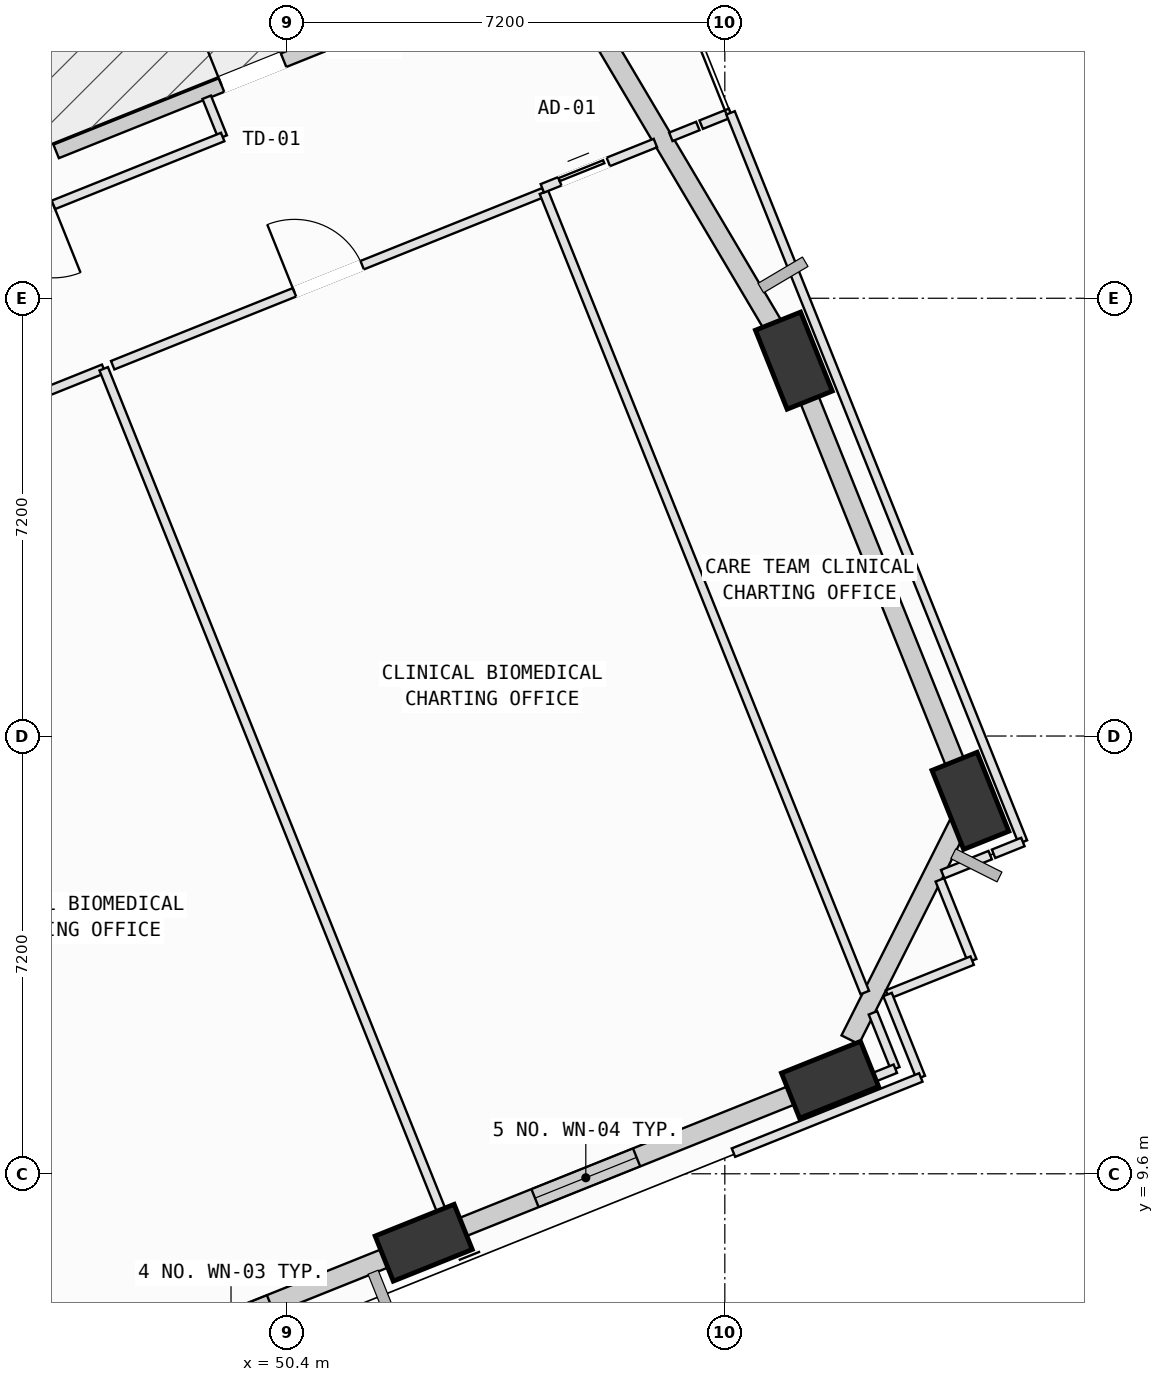
"""IFC4 building model, lengths in metres.
Left out: names, types, materials, properties, quantities, classifications, styles, units other than length and angle.
Written with IfcOpenShell. Run it as: python <this file> out.ifc"""

import sys

from ifc_helpers import new_model, si_unit, direction, frame, frame_2d, origin, origin_2d, place, context, subcontext, project, spatial, rectangle, extrude, element, fill, save


model = new_model("IFC4")
c1 = context("Model", 3, precision=1e-05, world=origin(), true_north=direction((0.0, 1.0)))
c2 = subcontext(c1, "Body", "Model", "MODEL_VIEW")
j1 = project(units=[si_unit("LENGTHUNIT", "METRE"), si_unit("PLANEANGLEUNIT", "RADIAN")], contexts=[c1])
p1 = place(None, origin())
s1 = spatial("IfcSite", under=j1, at=p1, CompositionType="ELEMENT")
p2 = place(p1, origin())
s2 = spatial("IfcBuilding", under=s1, at=p2, CompositionType="ELEMENT")
p3 = place(p2, frame((0.0, 0.0, 116.4)))
s3 = spatial("IfcBuildingStorey", under=s2, at=p3, CompositionType="ELEMENT", Elevation=116.4)
p4 = place(p3, frame((52.648, 8.466, 0.002), z_axis=(0.066717836338, 0.079113499919, 0.99463047633), x_axis=(-0.948183509475, 0.31537991624, 0.038516759879)))
e1 = element("IfcColumn", 1, at=p4, inside=s3, PredefinedType="COLUMN", context=c2, shape_type="SweptSolid", body=[
    extrude(rectangle(XDim=1.4, YDim=0.8, at=origin_2d()), origin(), (0.0, 0.0, 1.0), 4.018),
])
p5 = place(p3, frame((59.331, 11.146, 0.002), z_axis=(0.055313130163, 0.106380734984, 0.992785775913), x_axis=(-0.993950581944, 0.100353737632, 0.044624746467)))
e2 = element("IfcColumn", 2, at=p5, inside=s3, PredefinedType="COLUMN", context=c2, shape_type="SweptSolid", body=[
    extrude(rectangle(XDim=1.4, YDim=0.8, at=origin_2d()), origin(), (0.0, 0.0, 1.0), 4.025),
])
p6 = place(p3, frame((61.638, 15.734, 0.002), z_axis=(0.036384047559, 0.115701271238, 0.992617457492), x_axis=(0.07866044201, -0.990524915986, 0.112574089712)))
e3 = element("IfcColumn", 3, at=p6, inside=s3, PredefinedType="COLUMN", context=c2, shape_type="SweptSolid", body=[
    extrude(rectangle(XDim=1.4, YDim=0.8, at=origin_2d()), origin(), (0.0, 0.0, 1.0), 4.026),
])
p7 = place(p3, frame((58.735, 22.974, 0.002), z_axis=(0.006683668158, 0.103657617076, 0.994590582603), x_axis=(0.312007498998, -0.945175264526, 0.096410787244)))
e4 = element("IfcColumn", 4, at=p7, inside=s3, PredefinedType="COLUMN", context=c2, shape_type="SweptSolid", body=[
    extrude(rectangle(XDim=1.4, YDim=0.8, at=origin_2d()), origin(), (0.0, 0.0, 1.0), 4.018),
])
p8 = place(p3, frame((46.603, 26.415, 0.0), z_axis=(0.0, 0.0, 1.0), x_axis=(0.928154607931, 0.372194873389, 0.0)))
e5 = element("IfcWall", 5, at=p8, inside=s3, PredefinedType="SOLIDWALL", context=c2, shape_type="SweptSolid", body=[
    extrude(rectangle(XDim=6.96, YDim=0.24, at=frame_2d((3.48, 0.0))), origin(), (0.0, 0.0, 1.0), 2.945),
])
p9 = place(p8, frame((2.93, 0.0, 0.0)))
e6 = element("IfcOpeningElement", 6, at=p9, cuts=e5, PredefinedType="OPENING", context=c2, shape_type="SweptSolid", body=[
    extrude(rectangle(XDim=1.1, YDim=2.15, at=frame_2d((0.55, 1.075))), frame((0.0, 0.13, 0.0), z_axis=(0.0, -1.0, 0.0), x_axis=(1.0, 0.0, 0.0)), (0.0, 0.0, 1.0), 0.26),
])
p10 = place(p3, frame((52.366, 8.353, 0.0), z_axis=(0.0, 0.0, 1.0), x_axis=(-0.928164972463, -0.372169025972, 0.0)))
e7 = element("IfcWall", 7, at=p10, inside=s3, PredefinedType="SOLIDWALL", context=c2, shape_type="SweptSolid", body=[
    extrude(rectangle(XDim=6.218, YDim=0.32, at=frame_2d((3.109, 0.0))), origin(), (0.0, 0.0, 1.0), 3.165),
])
p11 = place(p10, frame((2.411, 0.0, 0.75)))
e8 = element("IfcOpeningElement", 8, at=p11, cuts=e7, PredefinedType="OPENING", context=c2, shape_type="SweptSolid", body=[
    extrude(rectangle(XDim=1.4, YDim=1.85, at=frame_2d((0.7, 0.925))), frame((0.0, 0.17, 0.0), z_axis=(0.0, -1.0, 0.0), x_axis=(1.0, 0.0, 0.0)), (0.0, 0.0, 1.0), 0.34),
])
p12 = place(p3, frame((59.064, 11.038, 0.0), z_axis=(0.0, 0.0, 1.0), x_axis=(-0.928163479726, -0.372172748739, 0.0)))
e9 = element("IfcWall", 9, at=p12, inside=s3, PredefinedType="SOLIDWALL", context=c2, shape_type="SweptSolid", body=[
    extrude(rectangle(XDim=6.242, YDim=0.32, at=frame_2d((3.121, 0.0))), origin(), (0.0, 0.0, 1.0), 3.165),
])
p13 = place(p12, frame((3.14, 0.0, 0.75)))
e10 = element("IfcOpeningElement", 10, at=p13, cuts=e9, PredefinedType="OPENING", context=c2, shape_type="SweptSolid", body=[
    extrude(rectangle(XDim=1.8, YDim=2.05, at=frame_2d((0.9, 1.025))), frame((0.0, 0.17, 0.0), z_axis=(0.0, -1.0, 0.0), x_axis=(1.0, 0.0, 0.0)), (0.0, 0.0, 1.0), 0.34),
])
p14 = place(p3, frame((61.524, 15.508, 0.0), z_axis=(0.0, 0.0, 1.0), x_axis=(-0.449332666057, -0.89336451419, 0.0)))
e11 = element("IfcWall", 11, at=p14, inside=s3, PredefinedType="SOLIDWALL", context=c2, shape_type="SweptSolid", body=[
    extrude(rectangle(XDim=4.145, YDim=0.32, at=frame_2d((2.073, 0.0))), origin(), (0.0, 0.0, 1.0), 3.165),
])
p15 = place(p3, frame((58.847, 22.696, 0.0), z_axis=(0.0, 0.0, 1.0), x_axis=(0.372172100897, -0.928163739495, 0.0)))
e12 = element("IfcWall", 12, at=p15, inside=s3, PredefinedType="SOLIDWALL", context=c2, shape_type="SweptSolid", body=[
    extrude(rectangle(XDim=6.84, YDim=0.32, at=frame_2d((3.42, 0.0))), origin(), (0.0, 0.0, 1.0), 3.165),
])
p16 = place(p3, frame((53.898, 31.141, 0.0), z_axis=(0.0, 0.0, 1.0), x_axis=(0.50965320776, -0.860379920628, 0.0)))
e13 = element("IfcWall", 13, at=p16, inside=s3, PredefinedType="SOLIDWALL", context=c2, shape_type="SweptSolid", body=[
    extrude(rectangle(XDim=8.838, YDim=0.32, at=frame_2d((4.419, 0.0))), origin(), (0.0, 0.0, 1.0), 3.165),
])
p17 = place(p3, frame((40.294, 19.996, 0.0), z_axis=(0.0, 0.0, 1.0), x_axis=(0.928134709593, 0.372244490689, 0.0)))
e14 = element("IfcWall", 14, at=p17, inside=s3, PredefinedType="PARTITIONING", context=c2, shape_type="SweptSolid", body=[
    extrude(rectangle(XDim=7.64, YDim=0.15, at=frame_2d((3.82, 0.0))), origin(), (0.0, 0.0, 1.0), 3.78),
])
p18 = place(p17, frame((3.22, 0.0, 0.0)))
e15 = element("IfcOpeningElement", 15, at=p18, cuts=e14, PredefinedType="OPENING", context=c2, shape_type="SweptSolid", body=[
    extrude(rectangle(XDim=1.2, YDim=2.15, at=frame_2d((0.6, 1.075))), frame((0.0, 0.085, 0.0), z_axis=(0.0, -1.0, 0.0), x_axis=(1.0, 0.0, 0.0)), (0.0, 0.0, 1.0), 0.17),
])
p19 = place(p3, frame((47.385, 22.84, 0.0), z_axis=(0.0, 0.0, 1.0), x_axis=(0.372168409569, -0.928165219624, 0.0)))
e16 = element("IfcWall", 16, at=p19, inside=s3, PredefinedType="PARTITIONING", context=c2, shape_type="SweptSolid", body=[
    extrude(rectangle(XDim=15.531, YDim=0.15, at=frame_2d((7.765, 0.0))), origin(), (0.0, 0.0, 1.0), 3.78),
])
p20 = place(p3, frame((53.165, 8.425, 0.0), z_axis=(0.0, 0.0, 1.0), x_axis=(-0.928081747062, -0.372376517479, 0.0)))
e17 = element("IfcWall", 17, at=p20, inside=s3, PredefinedType="PARTITIONING", context=c2, shape_type="SweptSolid", body=[
    extrude(rectangle(XDim=0.768, YDim=0.15, at=frame_2d((0.384, 0.0))), origin(), (0.0, 0.0, 1.0), 3.165),
])
p21 = place(p3, frame((47.533, 22.899, 0.0), z_axis=(0.0, 0.0, 1.0), x_axis=(0.928152417976, 0.372200334504, 0.0)))
e18 = element("IfcWall", 18, at=p21, inside=s3, PredefinedType="PARTITIONING", context=c2, shape_type="SweptSolid", body=[
    extrude(rectangle(XDim=7.641, YDim=0.15, at=frame_2d((3.821, 0.0))), origin(), (0.0, 0.0, 1.0), 3.78),
])
p22 = place(p21, frame((3.22, 0.0, 0.0)))
e19 = element("IfcOpeningElement", 19, at=p22, cuts=e18, PredefinedType="OPENING", context=c2, shape_type="SweptSolid", body=[
    extrude(rectangle(XDim=1.2, YDim=2.15, at=frame_2d((0.6, 1.075))), frame((0.0, 0.085, 0.0), z_axis=(0.0, -1.0, 0.0), x_axis=(1.0, 0.0, 0.0)), (0.0, 0.0, 1.0), 0.17),
])
p23 = place(p3, frame((54.625, 25.743, 0.0), z_axis=(0.0, 0.0, 1.0), x_axis=(0.372141564424, -0.928175983329, 0.0)))
e20 = element("IfcWall", 20, at=p23, inside=s3, PredefinedType="PARTITIONING", context=c2, shape_type="SweptSolid", body=[
    extrude(rectangle(XDim=14.18, YDim=0.15, at=frame_2d((7.09, 0.0))), origin(), (0.0, 0.0, 1.0), 3.78),
])
p24 = place(p3, frame((60.036, 12.247, 0.0), z_axis=(0.0, 0.0, 1.0), x_axis=(0.371815744607, -0.928306550694, 0.0)))
e21 = element("IfcWall", 21, at=p24, inside=s3, PredefinedType="PARTITIONING", context=c2, shape_type="SweptSolid", body=[
    extrude(rectangle(XDim=0.99, YDim=0.15, at=frame_2d((0.495, 0.0))), origin(), (0.0, 0.0, 1.0), 3.78),
])
p25 = place(p3, frame((60.404, 11.328, 0.0), z_axis=(0.0, 0.0, 1.0), x_axis=(-0.928252379933, -0.371950963366, 0.0)))
e22 = element("IfcWall", 22, at=p25, inside=s3, PredefinedType="PARTITIONING", context=c2, shape_type="SweptSolid", body=[
    extrude(rectangle(XDim=1.352, YDim=0.15, at=frame_2d((0.676, 0.0))), origin(), (0.0, 0.0, 1.0), 3.78),
])
p26 = place(p3, frame((49.079, 27.306, 0.0), z_axis=(0.0, 0.0, 1.0), x_axis=(0.373122259618, -0.927782183154, 0.0)))
e23 = element("IfcWall", 23, at=p26, inside=s3, PredefinedType="PARTITIONING", context=c2, shape_type="SweptSolid", body=[
    extrude(rectangle(XDim=0.705, YDim=0.15, at=frame_2d((0.352, 0.0))), origin(), (0.0, 0.0, 1.0), 3.78),
])
p27 = place(p3, frame((49.342, 26.652, 0.0), z_axis=(0.0, 0.0, 1.0), x_axis=(-0.928187259022, -0.372113439946, 0.0)))
e24 = element("IfcWall", 24, at=p27, inside=s3, PredefinedType="PARTITIONING", context=c2, shape_type="SweptSolid", body=[
    extrude(rectangle(XDim=4.717, YDim=0.15, at=frame_2d((2.358, 0.0))), origin(), (0.0, 0.0, 1.0), 2.945),
])
p28 = place(p27, frame((3.0, 0.0, 0.0)))
e25 = element("IfcOpeningElement", 25, at=p28, cuts=e24, PredefinedType="OPENING", context=c2, shape_type="SweptSolid", body=[
    extrude(rectangle(XDim=1.2, YDim=2.15, at=frame_2d((0.6, 1.075))), frame((0.0, 0.085, 0.0), z_axis=(0.0, -1.0, 0.0), x_axis=(1.0, 0.0, 0.0)), (0.0, 0.0, 1.0), 0.17),
])
p29 = place(p3, frame((61.964, 14.841, 0.0), z_axis=(0.0, 0.0, 1.0), x_axis=(-0.928236360629, -0.371990939145, 0.0)))
e26 = element("IfcWall", 26, at=p29, inside=s3, PredefinedType="PARTITIONING", context=c2, shape_type="SweptSolid", body=[
    extrude(rectangle(XDim=0.841, YDim=0.15, at=frame_2d((0.421, 0.0))), origin(), (0.0, 0.0, 1.0), 3.78),
])
p30 = place(p3, frame((61.136, 14.434, 0.0), z_axis=(0.0, 0.0, 1.0), x_axis=(0.371831953521, -0.928300058354, 0.0)))
e27 = element("IfcWall", 27, at=p30, inside=s3, PredefinedType="PARTITIONING", context=c2, shape_type="SweptSolid", body=[
    extrude(rectangle(XDim=1.431, YDim=0.15, at=frame_2d((0.715, 0.0))), origin(), (0.0, 0.0, 1.0), 3.78),
])
p31 = place(p3, frame((61.668, 13.106, 0.0), z_axis=(0.0, 0.0, 1.0), x_axis=(-0.928240735881, -0.371980021306, 0.0)))
e28 = element("IfcWall", 28, at=p31, inside=s3, PredefinedType="PARTITIONING", context=c2, shape_type="SweptSolid", body=[
    extrude(rectangle(XDim=1.5, YDim=0.15, at=frame_2d((0.75, 0.0))), origin(), (0.0, 0.0, 1.0), 3.78),
])
p32 = place(p3, frame((60.276, 12.548, 0.0), z_axis=(0.0, 0.0, 1.0), x_axis=(0.372278397591, -0.928121109924, 0.0)))
e29 = element("IfcWall", 29, at=p32, inside=s3, PredefinedType="PARTITIONING", context=c2, shape_type="SweptSolid", body=[
    extrude(rectangle(XDim=1.47, YDim=0.15, at=frame_2d((0.735, 0.0))), origin(), (0.0, 0.0, 1.0), 3.78),
])
p33 = place(p3, frame((60.823, 11.184, 0.0), z_axis=(0.0, 0.0, 1.0), x_axis=(-0.928095815957, -0.372341451362, 0.0)))
e30 = element("IfcWall", 30, at=p33, inside=s3, PredefinedType="PARTITIONING", context=c2, shape_type="SweptSolid", body=[
    extrude(rectangle(XDim=3.32, YDim=0.15, at=frame_2d((1.66, 0.0))), origin(), (0.0, 0.0, 1.0), 3.78),
])
p34 = place(p3, frame((54.599, 25.808, 0.0), z_axis=(0.0, 0.0, 1.0), x_axis=(0.928249506062, 0.371958135408, 0.0)))
e31 = element("IfcWall", 31, at=p34, inside=s3, PredefinedType="PARTITIONING", context=c2, shape_type="SweptSolid", body=[
    extrude(rectangle(XDim=2.003, YDim=0.15, at=frame_2d((1.001, 0.0))), origin(), (0.0, 0.0, 1.0), 3.78),
])
p35 = place(p34, frame((0.309, 0.0, 0.0)))
e32 = element("IfcOpeningElement", 32, at=p35, cuts=e31, PredefinedType="OPENING", context=c2, shape_type="SweptSolid", body=[
    extrude(rectangle(XDim=0.86, YDim=2.06, at=frame_2d((0.43, 1.03))), frame((0.0, 0.085, 0.0), z_axis=(0.0, -1.0, 0.0), x_axis=(1.0, 0.0, 0.0)), (0.0, 0.0, 1.0), 0.17),
])
p36 = place(p3, frame((56.712, 26.655, 0.0), z_axis=(0.0, 0.0, 1.0), x_axis=(0.928230136377, 0.372006470269, 0.0)))
e33 = element("IfcWall", 33, at=p36, inside=s3, PredefinedType="PARTITIONING", context=c2, shape_type="SweptSolid", body=[
    extrude(rectangle(XDim=0.479, YDim=0.15, at=frame_2d((0.239, 0.0))), origin(), (0.0, 0.0, 1.0), 3.78),
])
p37 = place(p3, frame((57.211, 26.855, 0.0), z_axis=(0.0, 0.0, 1.0), x_axis=(0.927925945016, 0.372764591353, 0.0)))
e34 = element("IfcWall", 34, at=p37, inside=s3, PredefinedType="PARTITIONING", context=c2, shape_type="SweptSolid", body=[
    extrude(rectangle(XDim=0.521, YDim=0.15, at=frame_2d((0.26, 0.0))), origin(), (0.0, 0.0, 1.0), 3.78),
])
p38 = place(p3, frame((57.694, 27.049, 0.0), z_axis=(0.0, 0.0, 1.0), x_axis=(0.372123604299, -0.928183184034, 0.0)))
e35 = element("IfcWall", 35, at=p38, inside=s3, PredefinedType="PARTITIONING", context=c2, shape_type="SweptSolid", body=[
    extrude(rectangle(XDim=12.92, YDim=0.15, at=frame_2d((6.46, 0.0))), origin(), (0.0, 0.0, 1.0), 3.165),
])
p39 = place(p3, frame((62.502, 15.057, 0.0), z_axis=(0.0, 0.0, 1.0), x_axis=(-0.927761889894, -0.37317271559, 0.0)))
e36 = element("IfcWall", 36, at=p39, inside=s3, PredefinedType="PARTITIONING", context=c2, shape_type="SweptSolid", body=[
    extrude(rectangle(XDim=0.52, YDim=0.15, at=frame_2d((0.26, 0.0))), origin(), (0.0, 0.0, 1.0), 3.78),
])
p40 = place(p9, origin())
e37 = element("IfcDoor", 37, at=p40, inside=s3, OperationType="SINGLE_SWING_LEFT", PredefinedType="DOOR", context=c2, shape_type="SweptSolid", body=[
    extrude(rectangle(XDim=1.1, YDim=2.15, at=frame_2d((0.55, 1.075))), frame((0.0, 0.025, 0.0), z_axis=(0.0, -1.0, 0.0), x_axis=(1.0, 0.0, 0.0)), (0.0, 0.0, 1.0), 0.05),
])
fill(e6, e37)
p41 = place(p13, origin())
e38 = element("IfcWindow", 38, at=p41, inside=s3, PartitioningType="SINGLE_PANEL", PredefinedType="WINDOW", context=c2, shape_type="SweptSolid", body=[
    extrude(rectangle(XDim=1.8, YDim=2.05, at=frame_2d((0.9, 1.025))), frame((0.0, 0.03, 0.0), z_axis=(0.0, -1.0, 0.0), x_axis=(1.0, 0.0, 0.0)), (0.0, 0.0, 1.0), 0.06),
])
fill(e10, e38)
p42 = place(p22, origin())
e39 = element("IfcDoor", 39, at=p42, inside=s3, OperationType="SINGLE_SWING_LEFT", PredefinedType="DOOR", context=c2, shape_type="SweptSolid", body=[
    extrude(rectangle(XDim=1.2, YDim=2.15, at=frame_2d((0.6, 1.075))), frame((0.0, 0.025, 0.0), z_axis=(0.0, -1.0, 0.0), x_axis=(1.0, 0.0, 0.0)), (0.0, 0.0, 1.0), 0.05),
])
fill(e19, e39)
p43 = place(p28, origin())
e40 = element("IfcDoor", 40, at=p43, inside=s3, OperationType="SINGLE_SWING_LEFT", PredefinedType="DOOR", context=c2, shape_type="SweptSolid", body=[
    extrude(rectangle(XDim=1.2, YDim=2.15, at=frame_2d((0.6, 1.075))), frame((0.0, 0.025, 0.0), z_axis=(0.0, -1.0, 0.0), x_axis=(1.0, 0.0, 0.0)), (0.0, 0.0, 1.0), 0.05),
])
fill(e25, e40)
p44 = place(p35, origin())
e41 = element("IfcDoor", 41, at=p44, inside=s3, OperationType="SLIDING_TO_LEFT", PredefinedType="DOOR", context=c2, shape_type="SweptSolid", body=[
    extrude(rectangle(XDim=0.86, YDim=2.06, at=frame_2d((0.43, 1.03))), frame((0.0, 0.025, 0.0), z_axis=(0.0, -1.0, 0.0), x_axis=(1.0, 0.0, 0.0)), (0.0, 0.0, 1.0), 0.05),
])
fill(e32, e41)
save(model, sys.argv[1])
